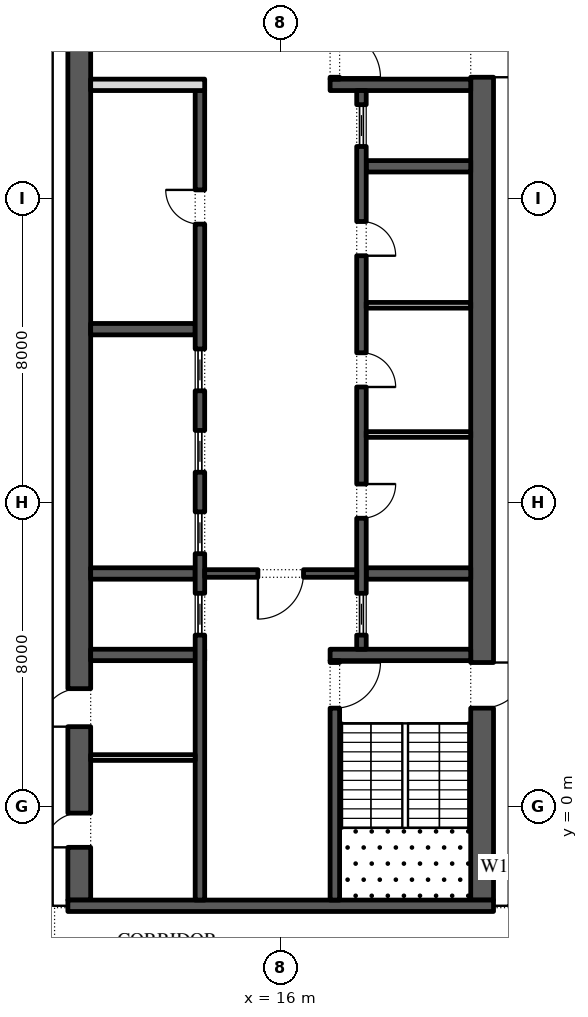
"""IFC4 building model, lengths in metres.
Left out: names, types, materials, properties, quantities, classifications, styles, units other than length and angle.
Written with IfcOpenShell. Run it as: python <this file> out.ifc"""

import sys

from ifc_helpers import new_model, si_unit, direction, frame, frame_2d, origin, place, context, subcontext, project, spatial, rectangle, extrude, element, fill, save


model = new_model("IFC4")
c1 = context("Model", 3, precision=1e-05, world=origin(), true_north=direction((0.0, 1.0)))
c2 = subcontext(c1, "Body", "Model", "MODEL_VIEW")
j1 = project(units=[si_unit("LENGTHUNIT", "METRE"), si_unit("PLANEANGLEUNIT", "RADIAN")], contexts=[c1])
p1 = place(None, origin())
s1 = spatial("IfcSite", under=j1, at=p1, CompositionType="ELEMENT")
p2 = place(p1, origin())
s2 = spatial("IfcBuilding", under=s1, at=p2, CompositionType="ELEMENT")
p3 = place(p2, frame((0.0, 0.0, 289.2)))
s3 = spatial("IfcBuildingStorey", under=s2, at=p3, CompositionType="ELEMENT", Elevation=289.2)
p4 = place(p3, frame((21.359, -11.678, 0.0), z_axis=(0.0, 0.0, 1.0), x_axis=(0.224949198343, 0.974370493275, 0.0)))
e1 = element("IfcWall", 1, at=p4, inside=s3, PredefinedType="STANDARD", context=c2, shape_type="SweptSolid", body=[
    extrude(rectangle(XDim=49.5, YDim=0.3, at=frame_2d((24.75, 0.0))), origin(), (0.0, 0.0, 1.0), 3.95),
])
p5 = place(p4, frame((1.157, 0.0, 0.45)))
e2 = element("IfcOpeningElement", 2, at=p5, cuts=e1, PredefinedType="OPENING", context=c2, shape_type="SweptSolid", body=[
    extrude(rectangle(XDim=4.5, YDim=3.05, at=frame_2d((2.25, 1.525))), frame((0.0, 0.16, 0.0), z_axis=(0.0, -1.0, 0.0), x_axis=(1.0, 0.0, 0.0)), (0.0, 0.0, 1.0), 0.32),
])
p6 = place(p4, frame((8.121, 0.0, 0.45)))
e3 = element("IfcOpeningElement", 3, at=p6, cuts=e1, PredefinedType="OPENING", context=c2, shape_type="SweptSolid", body=[
    extrude(rectangle(XDim=4.5, YDim=3.05, at=frame_2d((2.25, 1.525))), frame((0.0, 0.16, 0.0), z_axis=(0.0, -1.0, 0.0), x_axis=(1.0, 0.0, 0.0)), (0.0, 0.0, 1.0), 0.32),
])
p7 = place(p4, frame((15.236, 0.0, 0.45)))
e4 = element("IfcOpeningElement", 4, at=p7, cuts=e1, PredefinedType="OPENING", context=c2, shape_type="SweptSolid", body=[
    extrude(rectangle(XDim=4.5, YDim=3.05, at=frame_2d((2.25, 1.525))), frame((0.0, 0.16, 0.0), z_axis=(0.0, -1.0, 0.0), x_axis=(1.0, 0.0, 0.0)), (0.0, 0.0, 1.0), 0.32),
])
p8 = place(p4, frame((22.35, 0.0, 0.45)))
e5 = element("IfcOpeningElement", 5, at=p8, cuts=e1, PredefinedType="OPENING", context=c2, shape_type="SweptSolid", body=[
    extrude(rectangle(XDim=4.5, YDim=3.0, at=frame_2d((2.25, 1.5))), frame((0.0, 0.16, 0.0), z_axis=(0.0, -1.0, 0.0), x_axis=(1.0, 0.0, 0.0)), (0.0, 0.0, 1.0), 0.32),
])
p9 = place(p4, frame((29.464, 0.0, 0.45)))
e6 = element("IfcOpeningElement", 6, at=p9, cuts=e1, PredefinedType="OPENING", context=c2, shape_type="SweptSolid", body=[
    extrude(rectangle(XDim=4.5, YDim=2.9, at=frame_2d((2.25, 1.45))), frame((0.0, 0.16, 0.0), z_axis=(0.0, -1.0, 0.0), x_axis=(1.0, 0.0, 0.0)), (0.0, 0.0, 1.0), 0.32),
])
p10 = place(p4, frame((37.628, 0.0, 0.0)))
e7 = element("IfcOpeningElement", 7, at=p10, cuts=e1, PredefinedType="OPENING", context=c2, shape_type="SweptSolid", body=[
    extrude(rectangle(XDim=2.4, YDim=3.275, at=frame_2d((1.2, 1.637))), frame((0.0, 0.16, 0.0), z_axis=(0.0, -1.0, 0.0), x_axis=(1.0, 0.0, 0.0)), (0.0, 0.0, 1.0), 0.32),
])
p11 = place(p4, frame((43.693, 0.0, 0.45)))
e8 = element("IfcOpeningElement", 8, at=p11, cuts=e1, PredefinedType="OPENING", context=c2, shape_type="SweptSolid", body=[
    extrude(rectangle(XDim=4.5, YDim=3.05, at=frame_2d((2.25, 1.525))), frame((0.0, 0.16, 0.0), z_axis=(0.0, -1.0, 0.0), x_axis=(1.0, 0.0, 0.0)), (0.0, 0.0, 1.0), 0.32),
])
p12 = place(p3, frame((21.3, -2.45, 0.0), z_axis=(0.0, 0.0, 1.0), x_axis=(0.0, 1.0, 0.0)))
e9 = element("IfcWall", 9, at=p12, inside=s3, PredefinedType="SHEAR", context=c2, shape_type="SweptSolid", body=[
    extrude(rectangle(XDim=27.9, YDim=0.6, at=frame_2d((13.95, 0.0))), origin(), (0.0, 0.0, 1.0), 3.95),
])
p13 = place(p12, frame((5.05, 0.0, 0.0)))
e10 = element("IfcOpeningElement", 10, at=p13, cuts=e9, PredefinedType="OPENING", context=c2, shape_type="SweptSolid", body=[
    extrude(rectangle(XDim=1.2, YDim=2.1, at=frame_2d((0.6, 1.05))), frame((0.0, 0.31, 0.0), z_axis=(0.0, -1.0, 0.0), x_axis=(1.0, 0.0, 0.0)), (0.0, 0.0, 1.0), 0.62),
])
p14 = place(p12, frame((21.65, 0.0, 0.0)))
e11 = element("IfcOpeningElement", 11, at=p14, cuts=e9, PredefinedType="OPENING", context=c2, shape_type="SweptSolid", body=[
    extrude(rectangle(XDim=1.2, YDim=2.1, at=frame_2d((0.6, 1.05))), frame((0.0, 0.31, 0.0), z_axis=(0.0, -1.0, 0.0), x_axis=(1.0, 0.0, 0.0)), (0.0, 0.0, 1.0), 0.62),
])
p15 = place(p3, frame((10.7, -2.45, 0.0), z_axis=(0.0, 0.0, 1.0), x_axis=(0.0, 1.0, 0.0)))
e12 = element("IfcWall", 12, at=p15, inside=s3, PredefinedType="SHEAR", context=c2, shape_type="SweptSolid", body=[
    extrude(rectangle(XDim=27.9, YDim=0.6, at=frame_2d((13.95, 0.0))), origin(), (0.0, 0.0, 1.0), 3.95),
])
p16 = place(p15, frame((23.65, 0.0, 0.0)))
e13 = element("IfcOpeningElement", 13, at=p16, cuts=e12, PredefinedType="OPENING", context=c2, shape_type="SweptSolid", body=[
    extrude(rectangle(XDim=2.4, YDim=2.1, at=frame_2d((1.2, 1.05))), frame((0.0, 0.31, 0.0), z_axis=(0.0, -1.0, 0.0), x_axis=(1.0, 0.0, 0.0)), (0.0, 0.0, 1.0), 0.62),
])
p17 = place(p15, frame((1.387, 0.0, 0.0)))
e14 = element("IfcOpeningElement", 14, at=p17, cuts=e12, PredefinedType="OPENING", context=c2, shape_type="SweptSolid", body=[
    extrude(rectangle(XDim=0.9, YDim=2.1, at=frame_2d((0.45, 1.05))), frame((0.0, 0.31, 0.0), z_axis=(0.0, -1.0, 0.0), x_axis=(1.0, 0.0, 0.0)), (0.0, 0.0, 1.0), 0.62),
])
p18 = place(p15, frame((4.562, 0.0, 0.0)))
e15 = element("IfcOpeningElement", 15, at=p18, cuts=e12, PredefinedType="OPENING", context=c2, shape_type="SweptSolid", body=[
    extrude(rectangle(XDim=1.0, YDim=2.1, at=frame_2d((0.5, 1.05))), frame((0.0, 0.31, 0.0), z_axis=(0.0, -1.0, 0.0), x_axis=(1.0, 0.0, 0.0)), (0.0, 0.0, 1.0), 0.62),
])
p19 = place(p3, frame((10.4, -2.6, 0.0), z_axis=(0.0, 0.0, 1.0), x_axis=(1.0, 0.0, 0.0)))
e16 = element("IfcWall", 16, at=p19, inside=s3, PredefinedType="SHEAR", context=c2, shape_type="SweptSolid", body=[
    extrude(rectangle(XDim=11.2, YDim=0.3, at=frame_2d((5.6, 0.0))), origin(), (0.0, 0.0, 1.0), 3.95),
])
p20 = place(p3, frame((17.3, 4.0, 0.0), z_axis=(0.0, 0.0, 1.0), x_axis=(1.0, 0.0, 0.0)))
e17 = element("IfcWall", 17, at=p20, inside=s3, PredefinedType="SHEAR", context=c2, shape_type="SweptSolid", body=[
    extrude(rectangle(XDim=3.7, YDim=0.3, at=frame_2d((1.85, 0.0))), origin(), (0.0, 0.0, 1.0), 3.95),
])
p21 = place(p3, frame((17.425, -2.45, 0.0), z_axis=(0.0, 0.0, 1.0), x_axis=(0.0, 1.0, 0.0)))
e18 = element("IfcWall", 18, at=p21, inside=s3, PredefinedType="SHEAR", context=c2, shape_type="SweptSolid", body=[
    extrude(rectangle(XDim=6.3, YDim=0.25, at=frame_2d((3.15, 0.0))), origin(), (0.0, 0.0, 1.0), 3.95),
])
p22 = place(p21, frame((5.05, 0.0, 0.0)))
e19 = element("IfcOpeningElement", 19, at=p22, cuts=e18, PredefinedType="OPENING", context=c2, shape_type="SweptSolid", body=[
    extrude(rectangle(XDim=1.2, YDim=2.1, at=frame_2d((0.6, 1.05))), frame((0.0, 0.135, 0.0), z_axis=(0.0, -1.0, 0.0), x_axis=(1.0, 0.0, 0.0)), (0.0, 0.0, 1.0), 0.27),
])
p23 = place(p3, frame((17.3, 19.0, 0.0), z_axis=(0.0, 0.0, 1.0), x_axis=(1.0, 0.0, 0.0)))
e20 = element("IfcWall", 20, at=p23, inside=s3, PredefinedType="SHEAR", context=c2, shape_type="SweptSolid", body=[
    extrude(rectangle(XDim=3.7, YDim=0.3, at=frame_2d((1.85, 0.0))), origin(), (0.0, 0.0, 1.0), 3.95),
])
p24 = place(p3, frame((17.425, 19.15, 0.0), z_axis=(0.0, 0.0, 1.0), x_axis=(0.0, 1.0, 0.0)))
e21 = element("IfcWall", 21, at=p24, inside=s3, PredefinedType="SHEAR", context=c2, shape_type="SweptSolid", body=[
    extrude(rectangle(XDim=6.3, YDim=0.25, at=frame_2d((3.15, 0.0))), origin(), (0.0, 0.0, 1.0), 3.95),
])
p25 = place(p24, frame((0.05, 0.0, 0.0)))
e22 = element("IfcOpeningElement", 22, at=p25, cuts=e21, PredefinedType="OPENING", context=c2, shape_type="SweptSolid", body=[
    extrude(rectangle(XDim=1.2, YDim=2.1, at=frame_2d((0.6, 1.05))), frame((0.0, 0.135, 0.0), z_axis=(0.0, -1.0, 0.0), x_axis=(1.0, 0.0, 0.0)), (0.0, 0.0, 1.0), 0.27),
])
for number, where, z_axis, x_axis in (
    (23, (18.25, 6.143, 0.0), (0.0, 0.0, 1.0), (1.0, 0.0, 0.0)),
    (24, (18.25, 16.857, 0.0), (0.0, 0.0, 1.0), (1.0, 0.0, 0.0)),
):
    element("IfcWall", number, at=place(p3, frame(where, z_axis=z_axis, x_axis=x_axis)), inside=s3, PredefinedType="SHEAR", context=c2, shape_type="SweptSolid", body=[
        extrude(rectangle(XDim=2.75, YDim=0.3, at=frame_2d((1.375, 0.0))), origin(), (0.0, 0.0, 1.0), 3.95),
    ])
p26 = place(p3, frame((18.125, 4.15, 0.0), z_axis=(0.0, 0.0, 1.0), x_axis=(0.0, 1.0, 0.0)))
e25 = element("IfcWall", 25, at=p26, inside=s3, PredefinedType="SHEAR", context=c2, shape_type="SweptSolid", body=[
    extrude(rectangle(XDim=14.7, YDim=0.25, at=frame_2d((7.35, 0.0))), origin(), (0.0, 0.0, 1.0), 3.95),
])
p27 = place(p26, frame((3.446, 0.0, 0.0)))
e26 = element("IfcOpeningElement", 26, at=p27, cuts=e25, PredefinedType="OPENING", context=c2, shape_type="SweptSolid", body=[
    extrude(rectangle(XDim=0.9, YDim=2.1, at=frame_2d((0.45, 1.05))), frame((0.0, 0.135, 0.0), z_axis=(0.0, -1.0, 0.0), x_axis=(1.0, 0.0, 0.0)), (0.0, 0.0, 1.0), 0.27),
])
p28 = place(p26, frame((6.9, 0.0, 0.0)))
e27 = element("IfcOpeningElement", 27, at=p28, cuts=e25, PredefinedType="OPENING", context=c2, shape_type="SweptSolid", body=[
    extrude(rectangle(XDim=0.9, YDim=2.1, at=frame_2d((0.45, 1.05))), frame((0.0, 0.135, 0.0), z_axis=(0.0, -1.0, 0.0), x_axis=(1.0, 0.0, 0.0)), (0.0, 0.0, 1.0), 0.27),
])
p29 = place(p26, frame((10.354, 0.0, 0.0)))
e28 = element("IfcOpeningElement", 28, at=p29, cuts=e25, PredefinedType="OPENING", context=c2, shape_type="SweptSolid", body=[
    extrude(rectangle(XDim=0.9, YDim=2.1, at=frame_2d((0.45, 1.05))), frame((0.0, 0.135, 0.0), z_axis=(0.0, -1.0, 0.0), x_axis=(1.0, 0.0, 0.0)), (0.0, 0.0, 1.0), 0.27),
])
p30 = place(p26, frame((0.371, 0.0, 0.0)))
e29 = element("IfcOpeningElement", 29, at=p30, cuts=e25, PredefinedType="OPENING", context=c2, shape_type="SweptSolid", body=[
    extrude(rectangle(XDim=1.1, YDim=2.1, at=frame_2d((0.55, 1.05))), frame((0.0, 0.135, 0.0), z_axis=(0.0, -1.0, 0.0), x_axis=(1.0, 0.0, 0.0)), (0.0, 0.0, 1.0), 0.27),
])
p31 = place(p26, frame((13.229, 0.0, 0.0)))
e30 = element("IfcOpeningElement", 30, at=p31, cuts=e25, PredefinedType="OPENING", context=c2, shape_type="SweptSolid", body=[
    extrude(rectangle(XDim=1.1, YDim=2.1, at=frame_2d((0.55, 1.05))), frame((0.0, 0.135, 0.0), z_axis=(0.0, -1.0, 0.0), x_axis=(1.0, 0.0, 0.0)), (0.0, 0.0, 1.0), 0.27),
])
for number, where, z_axis, x_axis in (
    (31, (18.25, 9.8, 0.0), (0.0, 0.0, 1.0), (1.0, 0.0, 0.0)),
    (32, (18.25, 13.2, 0.0), (0.0, 0.0, 1.0), (1.0, 0.0, 0.0)),
):
    element("IfcWall", number, at=place(p3, frame(where, z_axis=z_axis, x_axis=x_axis)), inside=s3, PredefinedType="PARTITIONING", context=c2, shape_type="SweptSolid", body=[
        extrude(rectangle(XDim=2.75, YDim=0.15, at=frame_2d((1.375, 0.0))), origin(), (0.0, 0.0, 1.0), 3.95),
    ])
p32 = place(p3, frame((11.0, 4.0, 0.0), z_axis=(0.0, 0.0, 1.0), x_axis=(1.0, 0.0, 0.0)))
e33 = element("IfcWall", 33, at=p32, inside=s3, PredefinedType="SHEAR", context=c2, shape_type="SweptSolid", body=[
    extrude(rectangle(XDim=3.0, YDim=0.3, at=frame_2d((1.5, 0.0))), origin(), (0.0, 0.0, 1.0), 3.95),
])
for number, where, z_axis, x_axis in (
    (34, (11.0, 6.143, 0.0), (0.0, 0.0, 1.0), (1.0, 0.0, 0.0)),
    (35, (11.0, 12.571, 0.0), (0.0, 0.0, 1.0), (1.0, 0.0, 0.0)),
):
    element("IfcWall", number, at=place(p3, frame(where, z_axis=z_axis, x_axis=x_axis)), inside=s3, PredefinedType="SHEAR", context=c2, shape_type="SweptSolid", body=[
        extrude(rectangle(XDim=2.75, YDim=0.3, at=frame_2d((1.375, 0.0))), origin(), (0.0, 0.0, 1.0), 3.95),
    ])
p33 = place(p3, frame((13.875, -2.45, 0.0), z_axis=(0.0, 0.0, 1.0), x_axis=(0.0, 1.0, 0.0)))
e36 = element("IfcWall", 36, at=p33, inside=s3, PredefinedType="SHEAR", context=c2, shape_type="SweptSolid", body=[
    extrude(rectangle(XDim=21.3, YDim=0.25, at=frame_2d((10.65, 0.0))), origin(), (0.0, 0.0, 1.0), 3.95),
])
p34 = place(p33, frame((17.786, 0.0, 0.0)))
e37 = element("IfcOpeningElement", 37, at=p34, cuts=e36, PredefinedType="OPENING", context=c2, shape_type="SweptSolid", body=[
    extrude(rectangle(XDim=0.9, YDim=2.1, at=frame_2d((0.45, 1.05))), frame((0.0, 0.135, 0.0), z_axis=(0.0, -1.0, 0.0), x_axis=(1.0, 0.0, 0.0)), (0.0, 0.0, 1.0), 0.27),
])
p35 = place(p33, frame((6.971, 0.0, 0.0)))
e38 = element("IfcOpeningElement", 38, at=p35, cuts=e36, PredefinedType="OPENING", context=c2, shape_type="SweptSolid", body=[
    extrude(rectangle(XDim=1.1, YDim=2.1, at=frame_2d((0.55, 1.05))), frame((0.0, 0.135, 0.0), z_axis=(0.0, -1.0, 0.0), x_axis=(1.0, 0.0, 0.0)), (0.0, 0.0, 1.0), 0.27),
])
p36 = place(p33, frame((9.114, 0.0, 0.0)))
e39 = element("IfcOpeningElement", 39, at=p36, cuts=e36, PredefinedType="OPENING", context=c2, shape_type="SweptSolid", body=[
    extrude(rectangle(XDim=1.1, YDim=2.1, at=frame_2d((0.55, 1.05))), frame((0.0, 0.135, 0.0), z_axis=(0.0, -1.0, 0.0), x_axis=(1.0, 0.0, 0.0)), (0.0, 0.0, 1.0), 0.27),
])
p37 = place(p33, frame((11.257, 0.0, 0.0)))
e40 = element("IfcOpeningElement", 40, at=p37, cuts=e36, PredefinedType="OPENING", context=c2, shape_type="SweptSolid", body=[
    extrude(rectangle(XDim=1.1, YDim=2.1, at=frame_2d((0.55, 1.05))), frame((0.0, 0.135, 0.0), z_axis=(0.0, -1.0, 0.0), x_axis=(1.0, 0.0, 0.0)), (0.0, 0.0, 1.0), 0.27),
])
p38 = place(p33, frame((13.4, 0.0, 0.0)))
e41 = element("IfcOpeningElement", 41, at=p38, cuts=e36, PredefinedType="OPENING", context=c2, shape_type="SweptSolid", body=[
    extrude(rectangle(XDim=1.1, YDim=2.1, at=frame_2d((0.55, 1.05))), frame((0.0, 0.135, 0.0), z_axis=(0.0, -1.0, 0.0), x_axis=(1.0, 0.0, 0.0)), (0.0, 0.0, 1.0), 0.27),
])
p39 = place(p3, frame((11.0, 19.0, 0.0), z_axis=(0.0, 0.0, 1.0), x_axis=(1.0, 0.0, 0.0)))
e42 = element("IfcWall", 42, at=p39, inside=s3, PredefinedType="PARTITIONING", context=c2, shape_type="SweptSolid", body=[
    extrude(rectangle(XDim=3.0, YDim=0.3, at=frame_2d((1.5, 0.0))), origin(), (0.0, 0.0, 1.0), 3.95),
])
p40 = place(p3, frame((14.0, 6.143, 0.0), z_axis=(0.0, 0.0, 1.0), x_axis=(1.0, 0.0, 0.0)))
e43 = element("IfcWall", 43, at=p40, inside=s3, PredefinedType="SHEAR", context=c2, shape_type="SweptSolid", body=[
    extrude(rectangle(XDim=4.0, YDim=0.2, at=frame_2d((2.0, 0.0))), origin(), (0.0, 0.0, 1.0), 3.95),
])
p41 = place(p40, frame((1.4, 0.0, 0.0)))
e44 = element("IfcOpeningElement", 44, at=p41, cuts=e43, PredefinedType="OPENING", context=c2, shape_type="SweptSolid", body=[
    extrude(rectangle(XDim=1.2, YDim=2.1, at=frame_2d((0.6, 1.05))), frame((0.0, 0.11, 0.0), z_axis=(0.0, -1.0, 0.0), x_axis=(1.0, 0.0, 0.0)), (0.0, 0.0, 1.0), 0.22),
])
p42 = place(p3, frame((11.0, 1.3, 0.0), z_axis=(0.0, 0.0, 1.0), x_axis=(1.0, 0.0, 0.0)))
e45 = element("IfcWall", 45, at=p42, inside=s3, PredefinedType="PARTITIONING", context=c2, shape_type="SweptSolid", body=[
    extrude(rectangle(XDim=2.75, YDim=0.15, at=frame_2d((1.375, 0.0))), origin(), (0.0, 0.0, 1.0), 3.95),
])
p43 = place(p27, frame((0.9, -0.2, 0.0), z_axis=(0.0, 0.0, 1.0), x_axis=(-1.0, 0.0, 0.0)))
e46 = element("IfcDoor", 46, at=p43, inside=s3, OperationType="SINGLE_SWING_RIGHT", PredefinedType="DOOR", context=c2, shape_type="SweptSolid", body=[
    extrude(rectangle(XDim=0.9, YDim=2.1, at=frame_2d((0.45, 1.05))), frame((0.0, -0.075, 0.0), z_axis=(0.0, -1.0, 0.0), x_axis=(1.0, 0.0, 0.0)), (0.0, 0.0, 1.0), 0.05),
])
fill(e26, e46)
p44 = place(p28, frame((0.9, -0.2, 0.0), z_axis=(0.0, 0.0, 1.0), x_axis=(-1.0, 0.0, 0.0)))
e47 = element("IfcDoor", 47, at=p44, inside=s3, OperationType="SINGLE_SWING_LEFT", PredefinedType="DOOR", context=c2, shape_type="SweptSolid", body=[
    extrude(rectangle(XDim=0.9, YDim=2.1, at=frame_2d((0.45, 1.05))), frame((0.0, -0.075, 0.0), z_axis=(0.0, -1.0, 0.0), x_axis=(1.0, 0.0, 0.0)), (0.0, 0.0, 1.0), 0.05),
])
fill(e27, e47)
p45 = place(p29, frame((0.9, -0.2, 0.0), z_axis=(0.0, 0.0, 1.0), x_axis=(-1.0, 0.0, 0.0)))
e48 = element("IfcDoor", 48, at=p45, inside=s3, OperationType="SINGLE_SWING_LEFT", PredefinedType="DOOR", context=c2, shape_type="SweptSolid", body=[
    extrude(rectangle(XDim=0.9, YDim=2.1, at=frame_2d((0.45, 1.05))), frame((0.0, -0.075, 0.0), z_axis=(0.0, -1.0, 0.0), x_axis=(1.0, 0.0, 0.0)), (0.0, 0.0, 1.0), 0.05),
])
fill(e28, e48)
p46 = place(p30, origin())
e49 = element("IfcDoor", 49, at=p46, inside=s3, OperationType="SLIDING_TO_LEFT", PredefinedType="DOOR", context=c2, shape_type="SweptSolid", body=[
    extrude(rectangle(XDim=1.1, YDim=2.1, at=frame_2d((0.55, 1.05))), frame((0.0, 0.025, 0.0), z_axis=(0.0, -1.0, 0.0), x_axis=(1.0, 0.0, 0.0)), (0.0, 0.0, 1.0), 0.05),
])
fill(e29, e49)
p47 = place(p31, origin())
e50 = element("IfcDoor", 50, at=p47, inside=s3, OperationType="SLIDING_TO_LEFT", PredefinedType="DOOR", context=c2, shape_type="SweptSolid", body=[
    extrude(rectangle(XDim=1.1, YDim=2.1, at=frame_2d((0.55, 1.05))), frame((0.0, 0.025, 0.0), z_axis=(0.0, -1.0, 0.0), x_axis=(1.0, 0.0, 0.0)), (0.0, 0.0, 1.0), 0.05),
])
fill(e30, e50)
p48 = place(p34, origin())
e51 = element("IfcDoor", 51, at=p48, inside=s3, OperationType="SINGLE_SWING_LEFT", PredefinedType="DOOR", context=c2, shape_type="SweptSolid", body=[
    extrude(rectangle(XDim=0.9, YDim=2.1, at=frame_2d((0.45, 1.05))), frame((0.0, 0.125, 0.0), z_axis=(0.0, -1.0, 0.0), x_axis=(1.0, 0.0, 0.0)), (0.0, 0.0, 1.0), 0.05),
])
fill(e37, e51)
p49 = place(p35, origin())
e52 = element("IfcDoor", 52, at=p49, inside=s3, OperationType="SLIDING_TO_LEFT", PredefinedType="DOOR", context=c2, shape_type="SweptSolid", body=[
    extrude(rectangle(XDim=1.1, YDim=2.1, at=frame_2d((0.55, 1.05))), frame((0.0, 0.025, 0.0), z_axis=(0.0, -1.0, 0.0), x_axis=(1.0, 0.0, 0.0)), (0.0, 0.0, 1.0), 0.05),
])
fill(e38, e52)
p50 = place(p36, origin())
e53 = element("IfcDoor", 53, at=p50, inside=s3, OperationType="SLIDING_TO_LEFT", PredefinedType="DOOR", context=c2, shape_type="SweptSolid", body=[
    extrude(rectangle(XDim=1.1, YDim=2.1, at=frame_2d((0.55, 1.05))), frame((0.0, 0.025, 0.0), z_axis=(0.0, -1.0, 0.0), x_axis=(1.0, 0.0, 0.0)), (0.0, 0.0, 1.0), 0.05),
])
fill(e39, e53)
p51 = place(p37, origin())
e54 = element("IfcDoor", 54, at=p51, inside=s3, OperationType="SLIDING_TO_LEFT", PredefinedType="DOOR", context=c2, shape_type="SweptSolid", body=[
    extrude(rectangle(XDim=1.1, YDim=2.1, at=frame_2d((0.55, 1.05))), frame((0.0, 0.025, 0.0), z_axis=(0.0, -1.0, 0.0), x_axis=(1.0, 0.0, 0.0)), (0.0, 0.0, 1.0), 0.05),
])
fill(e40, e54)
p52 = place(p38, origin())
e55 = element("IfcDoor", 55, at=p52, inside=s3, OperationType="SLIDING_TO_LEFT", PredefinedType="DOOR", context=c2, shape_type="SweptSolid", body=[
    extrude(rectangle(XDim=1.1, YDim=2.1, at=frame_2d((0.55, 1.05))), frame((0.0, 0.025, 0.0), z_axis=(0.0, -1.0, 0.0), x_axis=(1.0, 0.0, 0.0)), (0.0, 0.0, 1.0), 0.05),
])
fill(e41, e55)
p53 = place(p41, frame((1.2, 0.0, 0.0), z_axis=(0.0, 0.0, 1.0), x_axis=(-1.0, 0.0, 0.0)))
e56 = element("IfcDoor", 56, at=p53, inside=s3, OperationType="SINGLE_SWING_LEFT", PredefinedType="DOOR", context=c2, shape_type="SweptSolid", body=[
    extrude(rectangle(XDim=1.2, YDim=2.1, at=frame_2d((0.6, 1.05))), frame((0.0, 0.025, 0.0), z_axis=(0.0, -1.0, 0.0), x_axis=(1.0, 0.0, 0.0)), (0.0, 0.0, 1.0), 0.05),
])
fill(e44, e56)
p54 = place(p22, frame((1.2, 0.0, 0.0), z_axis=(0.0, 0.0, 1.0), x_axis=(-1.0, 0.0, 0.0)))
e57 = element("IfcDoor", 57, at=p54, inside=s3, OperationType="SINGLE_SWING_RIGHT", PredefinedType="DOOR", context=c2, shape_type="SweptSolid", body=[
    extrude(rectangle(XDim=1.2, YDim=2.1, at=frame_2d((0.6, 1.05))), frame((0.0, 0.025, 0.0), z_axis=(0.0, -1.0, 0.0), x_axis=(1.0, 0.0, 0.0)), (0.0, 0.0, 1.0), 0.05),
])
fill(e19, e57)
p55 = place(p13, frame((1.2, 0.0, 0.0), z_axis=(0.0, 0.0, 1.0), x_axis=(-1.0, 0.0, 0.0)))
e58 = element("IfcDoor", 58, at=p55, inside=s3, OperationType="SINGLE_SWING_RIGHT", PredefinedType="DOOR", context=c2, shape_type="SweptSolid", body=[
    extrude(rectangle(XDim=1.2, YDim=2.1, at=frame_2d((0.6, 1.05))), frame((0.0, 0.025, 0.0), z_axis=(0.0, -1.0, 0.0), x_axis=(1.0, 0.0, 0.0)), (0.0, 0.0, 1.0), 0.05),
])
fill(e10, e58)
p56 = place(p25, frame((1.2, 0.0, 0.0), z_axis=(0.0, 0.0, 1.0), x_axis=(-1.0, 0.0, 0.0)))
e59 = element("IfcDoor", 59, at=p56, inside=s3, OperationType="SINGLE_SWING_LEFT", PredefinedType="DOOR", context=c2, shape_type="SweptSolid", body=[
    extrude(rectangle(XDim=1.2, YDim=2.1, at=frame_2d((0.6, 1.05))), frame((0.0, 0.025, 0.0), z_axis=(0.0, -1.0, 0.0), x_axis=(1.0, 0.0, 0.0)), (0.0, 0.0, 1.0), 0.05),
])
fill(e22, e59)
p57 = place(p14, frame((1.2, 0.0, 0.0), z_axis=(0.0, 0.0, 1.0), x_axis=(-1.0, 0.0, 0.0)))
e60 = element("IfcDoor", 60, at=p57, inside=s3, OperationType="SINGLE_SWING_LEFT", PredefinedType="DOOR", context=c2, shape_type="SweptSolid", body=[
    extrude(rectangle(XDim=1.2, YDim=2.1, at=frame_2d((0.6, 1.05))), frame((0.0, 0.025, 0.0), z_axis=(0.0, -1.0, 0.0), x_axis=(1.0, 0.0, 0.0)), (0.0, 0.0, 1.0), 0.05),
])
fill(e11, e60)
p58 = place(p17, origin())
e61 = element("IfcDoor", 61, at=p58, inside=s3, OperationType="SINGLE_SWING_RIGHT", PredefinedType="DOOR", context=c2, shape_type="SweptSolid", body=[
    extrude(rectangle(XDim=0.9, YDim=2.1, at=frame_2d((0.45, 1.05))), frame((0.0, -0.25, 0.0), z_axis=(0.0, -1.0, 0.0), x_axis=(1.0, 0.0, 0.0)), (0.0, 0.0, 1.0), 0.05),
])
fill(e14, e61)
p59 = place(p18, origin())
e62 = element("IfcDoor", 62, at=p59, inside=s3, OperationType="SINGLE_SWING_RIGHT", PredefinedType="DOOR", context=c2, shape_type="SweptSolid", body=[
    extrude(rectangle(XDim=1.0, YDim=2.1, at=frame_2d((0.5, 1.05))), frame((0.0, -0.25, 0.0), z_axis=(0.0, -1.0, 0.0), x_axis=(1.0, 0.0, 0.0)), (0.0, 0.0, 1.0), 0.05),
])
fill(e15, e62)
save(model, sys.argv[1])
